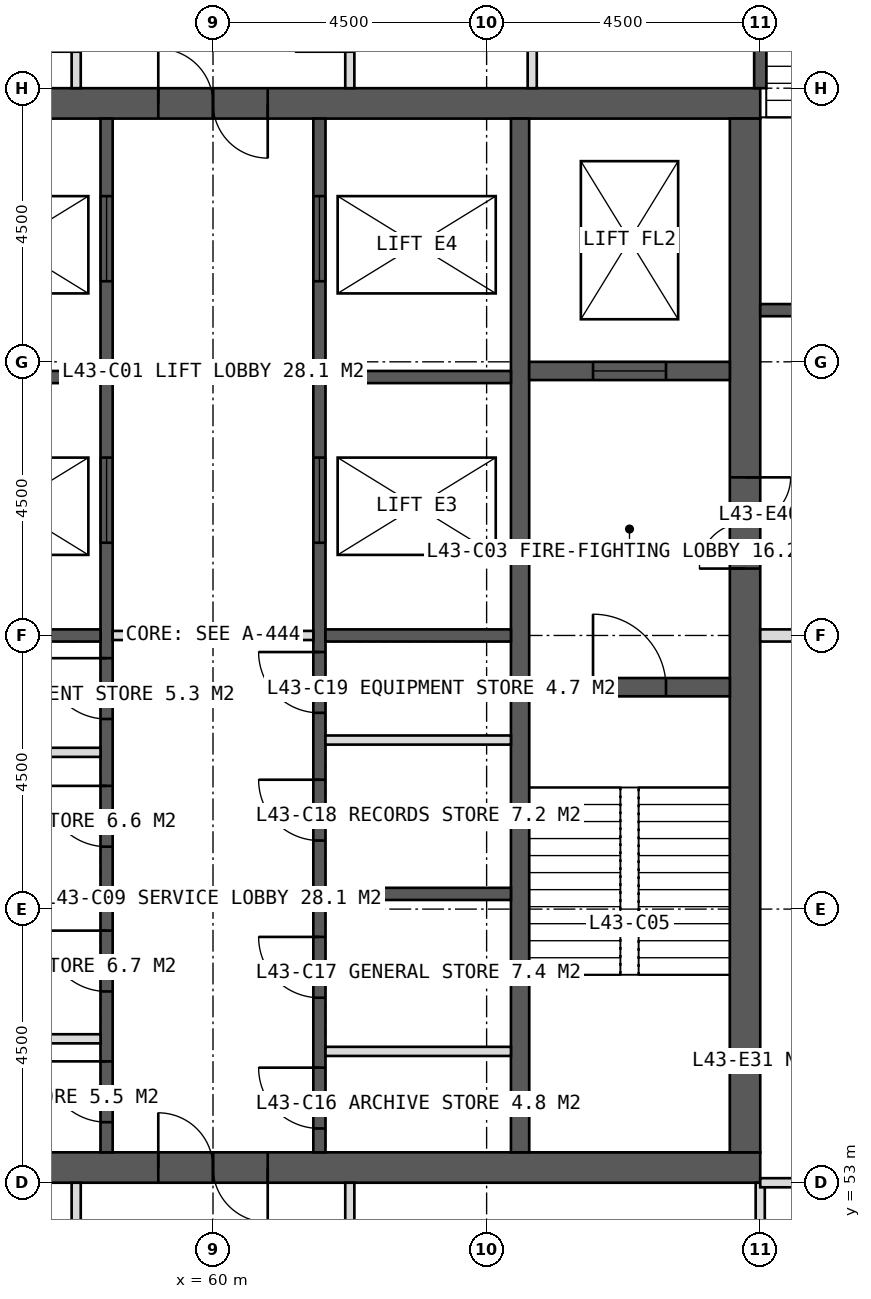
"""IFC4 building model, lengths in metres.
Left out: names, types, materials, properties, quantities, classifications, styles, units other than length and angle.
Written with IfcOpenShell. Run it as: python <this file> out.ifc"""

import sys

from ifc_helpers import new_model, si_unit, direction, frame, frame_2d, origin, place, context, subcontext, project, spatial, rectangle, extrude, element, fill, save


model = new_model("IFC4")
c1 = context("Model", 3, precision=1e-05, world=origin(), true_north=direction((0.0, 1.0)))
c2 = subcontext(c1, "Body", "Model", "MODEL_VIEW")
j1 = project(units=[si_unit("LENGTHUNIT", "METRE"), si_unit("PLANEANGLEUNIT", "RADIAN")], contexts=[c1])
p1 = place(None, origin())
s1 = spatial("IfcSite", under=j1, at=p1, CompositionType="ELEMENT")
p2 = place(p1, origin())
s2 = spatial("IfcBuilding", under=s1, at=p2, CompositionType="ELEMENT")
p3 = place(p2, frame((0.0, 0.0, 181.0)))
s3 = spatial("IfcBuildingStorey", under=s2, at=p3, CompositionType="ELEMENT", Elevation=181.0)
p4 = place(p3, frame((51.0, 70.75, 0.0), z_axis=(0.0, 0.0, 1.0), x_axis=(1.0, 0.0, 0.0)))
e1 = element("IfcWall", 1, at=p4, inside=s3, PredefinedType="SHEAR", context=c2, shape_type="SweptSolid", body=[
    extrude(rectangle(XDim=18.0, YDim=0.5, at=frame_2d((9.0, 0.0))), origin(), (0.0, 0.0, 1.0), 4.0),
])
p5 = place(p4, frame((8.1, 0.0, 0.0)))
e2 = element("IfcOpeningElement", 2, at=p5, cuts=e1, PredefinedType="OPENING", context=c2, shape_type="SweptSolid", body=[
    extrude(rectangle(XDim=1.8, YDim=2.2, at=frame_2d((0.9, 1.1))), frame((0.0, 0.26, 0.0), z_axis=(0.0, -1.0, 0.0), x_axis=(1.0, 0.0, 0.0)), (0.0, 0.0, 1.0), 0.52),
])
p6 = place(p3, frame((51.0, 53.25, 0.0), z_axis=(0.0, 0.0, 1.0), x_axis=(1.0, 0.0, 0.0)))
e3 = element("IfcWall", 3, at=p6, inside=s3, PredefinedType="SHEAR", context=c2, shape_type="SweptSolid", body=[
    extrude(rectangle(XDim=18.0, YDim=0.5, at=frame_2d((9.0, 0.0))), origin(), (0.0, 0.0, 1.0), 4.0),
])
p7 = place(p6, frame((8.1, 0.0, 0.0)))
e4 = element("IfcOpeningElement", 4, at=p7, cuts=e3, PredefinedType="OPENING", context=c2, shape_type="SweptSolid", body=[
    extrude(rectangle(XDim=1.8, YDim=2.2, at=frame_2d((0.9, 1.1))), frame((0.0, 0.26, 0.0), z_axis=(0.0, -1.0, 0.0), x_axis=(1.0, 0.0, 0.0)), (0.0, 0.0, 1.0), 0.52),
])
p8 = place(p3, frame((68.75, 53.5, 0.0), z_axis=(0.0, 0.0, 1.0), x_axis=(0.0, 1.0, 0.0)))
e5 = element("IfcWall", 5, at=p8, inside=s3, PredefinedType="SHEAR", context=c2, shape_type="SweptSolid", body=[
    extrude(rectangle(XDim=17.0, YDim=0.5, at=frame_2d((8.5, 0.0))), origin(), (0.0, 0.0, 1.0), 4.0),
])
p9 = place(p8, frame((9.6, 0.0, 0.0)))
e6 = element("IfcOpeningElement", 6, at=p9, cuts=e5, PredefinedType="OPENING", context=c2, shape_type="SweptSolid", body=[
    extrude(rectangle(XDim=1.5, YDim=2.2, at=frame_2d((0.75, 1.1))), frame((0.0, 0.26, 0.0), z_axis=(0.0, -1.0, 0.0), x_axis=(1.0, 0.0, 0.0)), (0.0, 0.0, 1.0), 0.52),
])
p10 = place(p3, frame((65.05, 53.5, 0.0), z_axis=(0.0, 0.0, 1.0), x_axis=(0.0, 1.0, 0.0)))
e7 = element("IfcWall", 7, at=p10, inside=s3, PredefinedType="SHEAR", context=c2, shape_type="SweptSolid", body=[
    extrude(rectangle(XDim=17.0, YDim=0.3, at=frame_2d((8.5, 0.0))), origin(), (0.0, 0.0, 1.0), 4.0),
])
p11 = place(p3, frame((58.25, 53.5, 0.0), z_axis=(0.0, 0.0, 1.0), x_axis=(0.0, 1.0, 0.0)))
e8 = element("IfcWall", 8, at=p11, inside=s3, PredefinedType="SHEAR", context=c2, shape_type="SweptSolid", body=[
    extrude(rectangle(XDim=17.0, YDim=0.2, at=frame_2d((8.5, 0.0))), origin(), (0.0, 0.0, 1.0), 4.0),
])
p12 = place(p11, frame((0.496, 0.0, 0.0)))
e9 = element("IfcOpeningElement", 9, at=p12, cuts=e8, PredefinedType="OPENING", context=c2, shape_type="SweptSolid", body=[
    extrude(rectangle(XDim=1.0, YDim=2.1, at=frame_2d((0.5, 1.05))), frame((0.0, 0.11, 0.0), z_axis=(0.0, -1.0, 0.0), x_axis=(1.0, 0.0, 0.0)), (0.0, 0.0, 1.0), 0.22),
])
p13 = place(p11, frame((2.646, 0.0, 0.0)))
e10 = element("IfcOpeningElement", 10, at=p13, cuts=e8, PredefinedType="OPENING", context=c2, shape_type="SweptSolid", body=[
    extrude(rectangle(XDim=1.0, YDim=2.1, at=frame_2d((0.5, 1.05))), frame((0.0, 0.11, 0.0), z_axis=(0.0, -1.0, 0.0), x_axis=(1.0, 0.0, 0.0)), (0.0, 0.0, 1.0), 0.22),
])
p14 = place(p11, frame((5.027, 0.0, 0.0)))
e11 = element("IfcOpeningElement", 11, at=p14, cuts=e8, PredefinedType="OPENING", context=c2, shape_type="SweptSolid", body=[
    extrude(rectangle(XDim=1.0, YDim=2.1, at=frame_2d((0.5, 1.05))), frame((0.0, 0.11, 0.0), z_axis=(0.0, -1.0, 0.0), x_axis=(1.0, 0.0, 0.0)), (0.0, 0.0, 1.0), 0.22),
])
p15 = place(p11, frame((7.126, 0.0, 0.0)))
e12 = element("IfcOpeningElement", 12, at=p15, cuts=e8, PredefinedType="OPENING", context=c2, shape_type="SweptSolid", body=[
    extrude(rectangle(XDim=1.0, YDim=2.1, at=frame_2d((0.5, 1.05))), frame((0.0, 0.11, 0.0), z_axis=(0.0, -1.0, 0.0), x_axis=(1.0, 0.0, 0.0)), (0.0, 0.0, 1.0), 0.22),
])
p16 = place(p11, frame((10.025, 0.0, 0.0)))
e13 = element("IfcOpeningElement", 13, at=p16, cuts=e8, PredefinedType="OPENING", context=c2, shape_type="SweptSolid", body=[
    extrude(rectangle(XDim=1.4, YDim=2.2, at=frame_2d((0.7, 1.1))), frame((0.0, 0.11, 0.0), z_axis=(0.0, -1.0, 0.0), x_axis=(1.0, 0.0, 0.0)), (0.0, 0.0, 1.0), 0.22),
])
p17 = place(p11, frame((14.325, 0.0, 0.0)))
e14 = element("IfcOpeningElement", 14, at=p17, cuts=e8, PredefinedType="OPENING", context=c2, shape_type="SweptSolid", body=[
    extrude(rectangle(XDim=1.4, YDim=2.2, at=frame_2d((0.7, 1.1))), frame((0.0, 0.11, 0.0), z_axis=(0.0, -1.0, 0.0), x_axis=(1.0, 0.0, 0.0)), (0.0, 0.0, 1.0), 0.22),
])
p18 = place(p3, frame((61.75, 53.5, 0.0), z_axis=(0.0, 0.0, 1.0), x_axis=(0.0, 1.0, 0.0)))
e15 = element("IfcWall", 15, at=p18, inside=s3, PredefinedType="SHEAR", context=c2, shape_type="SweptSolid", body=[
    extrude(rectangle(XDim=17.0, YDim=0.2, at=frame_2d((8.5, 0.0))), origin(), (0.0, 0.0, 1.0), 4.0),
])
p19 = place(p18, frame((0.393, 0.0, 0.0)))
e16 = element("IfcOpeningElement", 16, at=p19, cuts=e15, PredefinedType="OPENING", context=c2, shape_type="SweptSolid", body=[
    extrude(rectangle(XDim=1.0, YDim=2.1, at=frame_2d((0.5, 1.05))), frame((0.0, 0.11, 0.0), z_axis=(0.0, -1.0, 0.0), x_axis=(1.0, 0.0, 0.0)), (0.0, 0.0, 1.0), 0.22),
])
p20 = place(p18, frame((2.542, 0.0, 0.0)))
e17 = element("IfcOpeningElement", 17, at=p20, cuts=e15, PredefinedType="OPENING", context=c2, shape_type="SweptSolid", body=[
    extrude(rectangle(XDim=1.0, YDim=2.1, at=frame_2d((0.5, 1.05))), frame((0.0, 0.11, 0.0), z_axis=(0.0, -1.0, 0.0), x_axis=(1.0, 0.0, 0.0)), (0.0, 0.0, 1.0), 0.22),
])
p21 = place(p18, frame((5.127, 0.0, 0.0)))
e18 = element("IfcOpeningElement", 18, at=p21, cuts=e15, PredefinedType="OPENING", context=c2, shape_type="SweptSolid", body=[
    extrude(rectangle(XDim=1.0, YDim=2.1, at=frame_2d((0.5, 1.05))), frame((0.0, 0.11, 0.0), z_axis=(0.0, -1.0, 0.0), x_axis=(1.0, 0.0, 0.0)), (0.0, 0.0, 1.0), 0.22),
])
p22 = place(p18, frame((7.228, 0.0, 0.0)))
e19 = element("IfcOpeningElement", 19, at=p22, cuts=e15, PredefinedType="OPENING", context=c2, shape_type="SweptSolid", body=[
    extrude(rectangle(XDim=1.0, YDim=2.1, at=frame_2d((0.5, 1.05))), frame((0.0, 0.11, 0.0), z_axis=(0.0, -1.0, 0.0), x_axis=(1.0, 0.0, 0.0)), (0.0, 0.0, 1.0), 0.22),
])
p23 = place(p18, frame((10.025, 0.0, 0.0)))
e20 = element("IfcOpeningElement", 20, at=p23, cuts=e15, PredefinedType="OPENING", context=c2, shape_type="SweptSolid", body=[
    extrude(rectangle(XDim=1.4, YDim=2.2, at=frame_2d((0.7, 1.1))), frame((0.0, 0.11, 0.0), z_axis=(0.0, -1.0, 0.0), x_axis=(1.0, 0.0, 0.0)), (0.0, 0.0, 1.0), 0.22),
])
p24 = place(p18, frame((14.325, 0.0, 0.0)))
e21 = element("IfcOpeningElement", 21, at=p24, cuts=e15, PredefinedType="OPENING", context=c2, shape_type="SweptSolid", body=[
    extrude(rectangle(XDim=1.4, YDim=2.2, at=frame_2d((0.7, 1.1))), frame((0.0, 0.11, 0.0), z_axis=(0.0, -1.0, 0.0), x_axis=(1.0, 0.0, 0.0)), (0.0, 0.0, 1.0), 0.22),
])
for number, where, z_axis, x_axis in (
    (22, (55.1, 57.75, 0.0), (0.0, 0.0, 1.0), (1.0, 0.0, 0.0)),
    (23, (61.85, 57.75, 0.0), (0.0, 0.0, 1.0), (1.0, 0.0, 0.0)),
    (24, (55.1, 62.0, 0.0), (0.0, 0.0, 1.0), (1.0, 0.0, 0.0)),
    (25, (61.85, 62.0, 0.0), (0.0, 0.0, 1.0), (1.0, 0.0, 0.0)),
    (26, (55.1, 66.25, 0.0), (0.0, 0.0, 1.0), (1.0, 0.0, 0.0)),
    (27, (61.85, 66.25, 0.0), (0.0, 0.0, 1.0), (1.0, 0.0, 0.0)),
):
    element("IfcWall", number, at=place(p3, frame(where, z_axis=z_axis, x_axis=x_axis)), inside=s3, PredefinedType="SHEAR", context=c2, shape_type="SweptSolid", body=[
        extrude(rectangle(XDim=3.05, YDim=0.2, at=frame_2d((1.525, 0.0))), origin(), (0.0, 0.0, 1.0), 4.0),
    ])
p25 = place(p3, frame((65.2, 61.15, 0.0), z_axis=(0.0, 0.0, 1.0), x_axis=(1.0, 0.0, 0.0)))
e28 = element("IfcWall", 28, at=p25, inside=s3, PredefinedType="SHEAR", context=c2, shape_type="SweptSolid", body=[
    extrude(rectangle(XDim=3.3, YDim=0.3, at=frame_2d((1.65, 0.0))), origin(), (0.0, 0.0, 1.0), 4.0),
])
p26 = place(p25, frame((1.05, 0.0, 0.0)))
e29 = element("IfcOpeningElement", 29, at=p26, cuts=e28, PredefinedType="OPENING", context=c2, shape_type="SweptSolid", body=[
    extrude(rectangle(XDim=1.2, YDim=2.1, at=frame_2d((0.6, 1.05))), frame((0.0, 0.16, 0.0), z_axis=(0.0, -1.0, 0.0), x_axis=(1.0, 0.0, 0.0)), (0.0, 0.0, 1.0), 0.32),
])
p27 = place(p3, frame((65.2, 66.35, 0.0), z_axis=(0.0, 0.0, 1.0), x_axis=(1.0, 0.0, 0.0)))
e30 = element("IfcWall", 30, at=p27, inside=s3, PredefinedType="SHEAR", context=c2, shape_type="SweptSolid", body=[
    extrude(rectangle(XDim=3.3, YDim=0.3, at=frame_2d((1.65, 0.0))), origin(), (0.0, 0.0, 1.0), 4.0),
])
p28 = place(p27, frame((1.05, 0.0, 0.0)))
e31 = element("IfcOpeningElement", 31, at=p28, cuts=e30, PredefinedType="OPENING", context=c2, shape_type="SweptSolid", body=[
    extrude(rectangle(XDim=1.2, YDim=2.2, at=frame_2d((0.6, 1.1))), frame((0.0, 0.16, 0.0), z_axis=(0.0, -1.0, 0.0), x_axis=(1.0, 0.0, 0.0)), (0.0, 0.0, 1.0), 0.32),
])
p29 = place(p3, frame((57.75, 71.0, 0.0), z_axis=(0.0, 0.0, 1.0), x_axis=(0.0, 1.0, 0.0)))
e32 = element("IfcWall", 32, at=p29, inside=s3, PredefinedType="PARTITIONING", context=c2, shape_type="SweptSolid", body=[
    extrude(rectangle(XDim=3.6, YDim=0.15, at=frame_2d((1.8, 0.0))), origin(), (0.0, 0.0, 1.0), 3.75),
])
p30 = place(p29, frame((0.6, 0.0, 0.0)))
e33 = element("IfcOpeningElement", 33, at=p30, cuts=e32, PredefinedType="OPENING", context=c2, shape_type="SweptSolid", body=[
    extrude(rectangle(XDim=0.9, YDim=2.1, at=frame_2d((0.45, 1.05))), frame((0.0, 0.085, 0.0), z_axis=(0.0, -1.0, 0.0), x_axis=(1.0, 0.0, 0.0)), (0.0, 0.0, 1.0), 0.17),
])
p31 = place(p3, frame((62.25, 71.0, 0.0), z_axis=(0.0, 0.0, 1.0), x_axis=(0.0, 1.0, 0.0)))
e34 = element("IfcWall", 34, at=p31, inside=s3, PredefinedType="PARTITIONING", context=c2, shape_type="SweptSolid", body=[
    extrude(rectangle(XDim=3.6, YDim=0.15, at=frame_2d((1.8, 0.0))), origin(), (0.0, 0.0, 1.0), 3.75),
])
p32 = place(p31, frame((0.6, 0.0, 0.0)))
e35 = element("IfcOpeningElement", 35, at=p32, cuts=e34, PredefinedType="OPENING", context=c2, shape_type="SweptSolid", body=[
    extrude(rectangle(XDim=0.9, YDim=2.1, at=frame_2d((0.45, 1.05))), frame((0.0, 0.085, 0.0), z_axis=(0.0, -1.0, 0.0), x_axis=(1.0, 0.0, 0.0)), (0.0, 0.0, 1.0), 0.17),
])
p33 = place(p3, frame((65.25, 71.0, 0.0), z_axis=(0.0, 0.0, 1.0), x_axis=(0.0, 1.0, 0.0)))
e36 = element("IfcWall", 36, at=p33, inside=s3, PredefinedType="PARTITIONING", context=c2, shape_type="SweptSolid", body=[
    extrude(rectangle(XDim=2.4, YDim=0.15, at=frame_2d((1.2, 0.0))), origin(), (0.0, 0.0, 1.0), 3.75),
])
p34 = place(p3, frame((69.0, 53.0, 0.0), z_axis=(0.0, 0.0, 1.0), x_axis=(0.0, -1.0, 0.0)))
e37 = element("IfcWall", 37, at=p34, inside=s3, PredefinedType="PARTITIONING", context=c2, shape_type="SweptSolid", body=[
    extrude(rectangle(XDim=5.1, YDim=0.15, at=frame_2d((2.55, 0.0))), origin(), (0.0, 0.0, 1.0), 3.75),
])
for number, where, z_axis, x_axis in (
    (38, (62.25, 53.0, 0.0), (0.0, 0.0, 1.0), (0.0, -1.0, 0.0)),
    (39, (57.75, 53.0, 0.0), (0.0, 0.0, 1.0), (0.0, -1.0, 0.0)),
):
    element("IfcWall", number, at=place(p3, frame(where, z_axis=z_axis, x_axis=x_axis)), inside=s3, PredefinedType="PARTITIONING", context=c2, shape_type="SweptSolid", body=[
        extrude(rectangle(XDim=3.6, YDim=0.15, at=frame_2d((1.8, 0.0))), origin(), (0.0, 0.0, 1.0), 3.75),
    ])
p35 = place(p3, frame((69.0, 62.0, 0.0), z_axis=(0.0, 0.0, 1.0), x_axis=(1.0, 0.0, 0.0)))
e40 = element("IfcWall", 40, at=p35, inside=s3, PredefinedType="SOLIDWALL", context=c2, shape_type="SweptSolid", body=[
    extrude(rectangle(XDim=5.1, YDim=0.2, at=frame_2d((2.55, 0.0))), origin(), (0.0, 0.0, 1.0), 2.95),
])
p36 = place(p3, frame((69.0, 53.0, 0.0), z_axis=(0.0, 0.0, 1.0), x_axis=(1.0, 0.0, 0.0)))
e41 = element("IfcWall", 41, at=p36, inside=s3, PredefinedType="PARTITIONING", context=c2, shape_type="SweptSolid", body=[
    extrude(rectangle(XDim=5.1, YDim=0.15, at=frame_2d((2.55, 0.0))), origin(), (0.0, 0.0, 1.0), 3.75),
])
for number, where, z_axis, x_axis in (
    (42, (55.1, 55.367, 0.0), (0.0, 0.0, 1.0), (1.0, 0.0, 0.0)),
    (43, (61.85, 55.16, 0.0), (0.0, 0.0, 1.0), (1.0, 0.0, 0.0)),
    (44, (55.1, 60.078, 0.0), (0.0, 0.0, 1.0), (1.0, 0.0, 0.0)),
    (45, (61.85, 60.28, 0.0), (0.0, 0.0, 1.0), (1.0, 0.0, 0.0)),
):
    element("IfcWall", number, at=place(p3, frame(where, z_axis=z_axis, x_axis=x_axis)), inside=s3, PredefinedType="PARTITIONING", context=c2, shape_type="SweptSolid", body=[
        extrude(rectangle(XDim=3.05, YDim=0.15, at=frame_2d((1.525, 0.0))), origin(), (0.0, 0.0, 1.0), 3.75),
    ])
p37 = place(p3, frame((58.35, 62.0, 0.0), z_axis=(0.0, 0.0, 1.0), x_axis=(1.0, 0.0, 0.0)))
e46 = element("IfcWall", 46, at=p37, inside=s3, PredefinedType="PARTITIONING", context=c2, shape_type="SweptSolid", body=[
    extrude(rectangle(XDim=3.3, YDim=0.15, at=frame_2d((1.65, 0.0))), origin(), (0.0, 0.0, 1.0), 3.75),
])
p38 = place(p3, frame((69.0, 71.0, 0.0), z_axis=(0.0, 0.0, 1.0), x_axis=(0.0, 1.0, 0.0)))
e47 = element("IfcWall", 47, at=p38, inside=s3, PredefinedType="SOLIDWALL", context=c2, shape_type="SweptSolid", body=[
    extrude(rectangle(XDim=4.1, YDim=0.2, at=frame_2d((2.05, 0.0))), origin(), (0.0, 0.0, 1.0), 3.75),
])
p39 = place(p3, frame((69.0, 67.35, 0.0), z_axis=(0.0, 0.0, 1.0), x_axis=(1.0, 0.0, 0.0)))
e48 = element("IfcWall", 48, at=p39, inside=s3, PredefinedType="SOLIDWALL", context=c2, shape_type="SweptSolid", body=[
    extrude(rectangle(XDim=3.5, YDim=0.2, at=frame_2d((1.75, 0.0))), origin(), (0.0, 0.0, 1.0), 3.75),
])
p40 = place(p5, origin())
e49 = element("IfcDoor", 49, at=p40, inside=s3, OperationType="DOUBLE_DOOR_SINGLE_SWING", PredefinedType="DOOR", context=c2, shape_type="SweptSolid", body=[
    extrude(rectangle(XDim=1.8, YDim=2.2, at=frame_2d((0.9, 1.1))), frame((0.0, 0.025, 0.0), z_axis=(0.0, -1.0, 0.0), x_axis=(1.0, 0.0, 0.0)), (0.0, 0.0, 1.0), 0.05),
])
fill(e2, e49)
p41 = place(p9, origin())
e50 = element("IfcDoor", 50, at=p41, inside=s3, OperationType="DOUBLE_DOOR_SINGLE_SWING", PredefinedType="DOOR", context=c2, shape_type="SweptSolid", body=[
    extrude(rectangle(XDim=1.5, YDim=2.2, at=frame_2d((0.75, 1.1))), frame((0.0, 0.025, 0.0), z_axis=(0.0, -1.0, 0.0), x_axis=(1.0, 0.0, 0.0)), (0.0, 0.0, 1.0), 0.05),
])
fill(e6, e50)
p42 = place(p26, origin())
e51 = element("IfcDoor", 51, at=p42, inside=s3, OperationType="SINGLE_SWING_LEFT", PredefinedType="DOOR", context=c2, shape_type="SweptSolid", body=[
    extrude(rectangle(XDim=1.2, YDim=2.1, at=frame_2d((0.6, 1.05))), frame((0.0, 0.025, 0.0), z_axis=(0.0, -1.0, 0.0), x_axis=(1.0, 0.0, 0.0)), (0.0, 0.0, 1.0), 0.05),
])
fill(e29, e51)
p43 = place(p28, origin())
e52 = element("IfcDoor", 52, at=p43, inside=s3, OperationType="SLIDING_TO_LEFT", PredefinedType="DOOR", context=c2, shape_type="SweptSolid", body=[
    extrude(rectangle(XDim=1.2, YDim=2.2, at=frame_2d((0.6, 1.1))), frame((0.0, 0.025, 0.0), z_axis=(0.0, -1.0, 0.0), x_axis=(1.0, 0.0, 0.0)), (0.0, 0.0, 1.0), 0.05),
])
fill(e31, e52)
p44 = place(p12, origin())
e53 = element("IfcDoor", 53, at=p44, inside=s3, OperationType="SINGLE_SWING_RIGHT", PredefinedType="DOOR", context=c2, shape_type="SweptSolid", body=[
    extrude(rectangle(XDim=1.0, YDim=2.1, at=frame_2d((0.5, 1.05))), frame((0.0, 0.025, 0.0), z_axis=(0.0, -1.0, 0.0), x_axis=(1.0, 0.0, 0.0)), (0.0, 0.0, 1.0), 0.05),
])
fill(e9, e53)
p45 = place(p13, origin())
e54 = element("IfcDoor", 54, at=p45, inside=s3, OperationType="SINGLE_SWING_RIGHT", PredefinedType="DOOR", context=c2, shape_type="SweptSolid", body=[
    extrude(rectangle(XDim=1.0, YDim=2.1, at=frame_2d((0.5, 1.05))), frame((0.0, 0.025, 0.0), z_axis=(0.0, -1.0, 0.0), x_axis=(1.0, 0.0, 0.0)), (0.0, 0.0, 1.0), 0.05),
])
fill(e10, e54)
p46 = place(p19, origin())
e55 = element("IfcDoor", 55, at=p46, inside=s3, OperationType="SINGLE_SWING_RIGHT", PredefinedType="DOOR", context=c2, shape_type="SweptSolid", body=[
    extrude(rectangle(XDim=1.0, YDim=2.1, at=frame_2d((0.5, 1.05))), frame((0.0, 0.025, 0.0), z_axis=(0.0, -1.0, 0.0), x_axis=(1.0, 0.0, 0.0)), (0.0, 0.0, 1.0), 0.05),
])
fill(e16, e55)
p47 = place(p20, origin())
e56 = element("IfcDoor", 56, at=p47, inside=s3, OperationType="SINGLE_SWING_RIGHT", PredefinedType="DOOR", context=c2, shape_type="SweptSolid", body=[
    extrude(rectangle(XDim=1.0, YDim=2.1, at=frame_2d((0.5, 1.05))), frame((0.0, 0.025, 0.0), z_axis=(0.0, -1.0, 0.0), x_axis=(1.0, 0.0, 0.0)), (0.0, 0.0, 1.0), 0.05),
])
fill(e17, e56)
p48 = place(p14, origin())
e57 = element("IfcDoor", 57, at=p48, inside=s3, OperationType="SINGLE_SWING_RIGHT", PredefinedType="DOOR", context=c2, shape_type="SweptSolid", body=[
    extrude(rectangle(XDim=1.0, YDim=2.1, at=frame_2d((0.5, 1.05))), frame((0.0, 0.025, 0.0), z_axis=(0.0, -1.0, 0.0), x_axis=(1.0, 0.0, 0.0)), (0.0, 0.0, 1.0), 0.05),
])
fill(e11, e57)
p49 = place(p15, origin())
e58 = element("IfcDoor", 58, at=p49, inside=s3, OperationType="SINGLE_SWING_RIGHT", PredefinedType="DOOR", context=c2, shape_type="SweptSolid", body=[
    extrude(rectangle(XDim=1.0, YDim=2.1, at=frame_2d((0.5, 1.05))), frame((0.0, 0.025, 0.0), z_axis=(0.0, -1.0, 0.0), x_axis=(1.0, 0.0, 0.0)), (0.0, 0.0, 1.0), 0.05),
])
fill(e12, e58)
p50 = place(p21, origin())
e59 = element("IfcDoor", 59, at=p50, inside=s3, OperationType="SINGLE_SWING_RIGHT", PredefinedType="DOOR", context=c2, shape_type="SweptSolid", body=[
    extrude(rectangle(XDim=1.0, YDim=2.1, at=frame_2d((0.5, 1.05))), frame((0.0, 0.025, 0.0), z_axis=(0.0, -1.0, 0.0), x_axis=(1.0, 0.0, 0.0)), (0.0, 0.0, 1.0), 0.05),
])
fill(e18, e59)
p51 = place(p22, origin())
e60 = element("IfcDoor", 60, at=p51, inside=s3, OperationType="SINGLE_SWING_RIGHT", PredefinedType="DOOR", context=c2, shape_type="SweptSolid", body=[
    extrude(rectangle(XDim=1.0, YDim=2.1, at=frame_2d((0.5, 1.05))), frame((0.0, 0.025, 0.0), z_axis=(0.0, -1.0, 0.0), x_axis=(1.0, 0.0, 0.0)), (0.0, 0.0, 1.0), 0.05),
])
fill(e19, e60)
p52 = place(p16, origin())
e61 = element("IfcDoor", 61, at=p52, inside=s3, OperationType="SLIDING_TO_LEFT", PredefinedType="DOOR", context=c2, shape_type="SweptSolid", body=[
    extrude(rectangle(XDim=1.4, YDim=2.2, at=frame_2d((0.7, 1.1))), frame((0.0, 0.025, 0.0), z_axis=(0.0, -1.0, 0.0), x_axis=(1.0, 0.0, 0.0)), (0.0, 0.0, 1.0), 0.05),
])
fill(e13, e61)
p53 = place(p23, origin())
e62 = element("IfcDoor", 62, at=p53, inside=s3, OperationType="SLIDING_TO_LEFT", PredefinedType="DOOR", context=c2, shape_type="SweptSolid", body=[
    extrude(rectangle(XDim=1.4, YDim=2.2, at=frame_2d((0.7, 1.1))), frame((0.0, 0.025, 0.0), z_axis=(0.0, -1.0, 0.0), x_axis=(1.0, 0.0, 0.0)), (0.0, 0.0, 1.0), 0.05),
])
fill(e20, e62)
p54 = place(p17, origin())
e63 = element("IfcDoor", 63, at=p54, inside=s3, OperationType="SLIDING_TO_LEFT", PredefinedType="DOOR", context=c2, shape_type="SweptSolid", body=[
    extrude(rectangle(XDim=1.4, YDim=2.2, at=frame_2d((0.7, 1.1))), frame((0.0, 0.025, 0.0), z_axis=(0.0, -1.0, 0.0), x_axis=(1.0, 0.0, 0.0)), (0.0, 0.0, 1.0), 0.05),
])
fill(e14, e63)
p55 = place(p24, origin())
e64 = element("IfcDoor", 64, at=p55, inside=s3, OperationType="SLIDING_TO_LEFT", PredefinedType="DOOR", context=c2, shape_type="SweptSolid", body=[
    extrude(rectangle(XDim=1.4, YDim=2.2, at=frame_2d((0.7, 1.1))), frame((0.0, 0.025, 0.0), z_axis=(0.0, -1.0, 0.0), x_axis=(1.0, 0.0, 0.0)), (0.0, 0.0, 1.0), 0.05),
])
fill(e21, e64)
p56 = place(p7, origin())
e65 = element("IfcDoor", 65, at=p56, inside=s3, OperationType="DOUBLE_DOOR_SINGLE_SWING", PredefinedType="DOOR", context=c2, shape_type="SweptSolid", body=[
    extrude(rectangle(XDim=1.8, YDim=2.2, at=frame_2d((0.9, 1.1))), frame((0.0, 0.025, 0.0), z_axis=(0.0, -1.0, 0.0), x_axis=(1.0, 0.0, 0.0)), (0.0, 0.0, 1.0), 0.05),
])
fill(e4, e65)
save(model, sys.argv[1])
